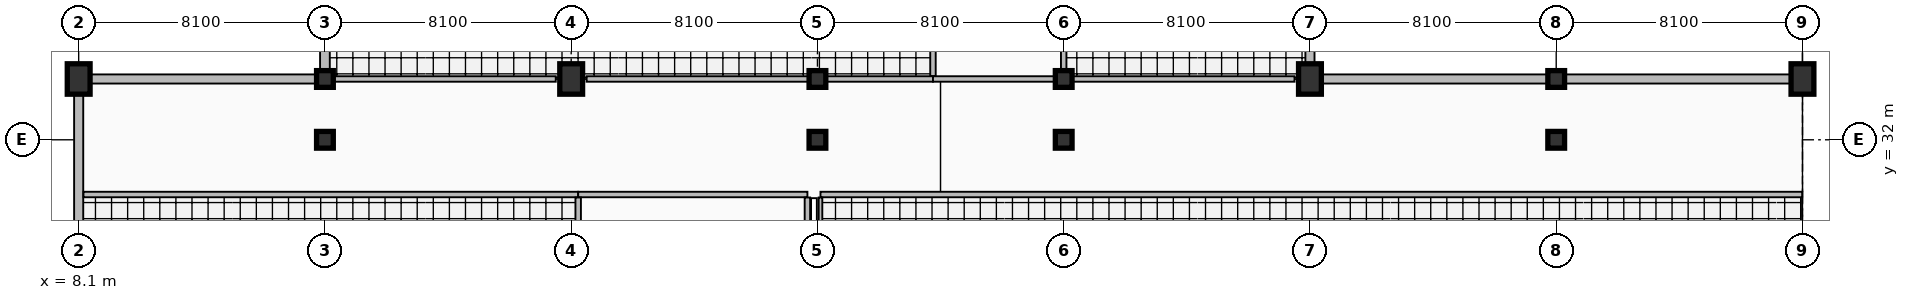
"""IFC4 building model, lengths in metres.
Left out: names, types, materials, properties, quantities, classifications, styles, units other than length and angle.
Written with IfcOpenShell. Run it as: python <this file> out.ifc"""

import sys

from ifc_helpers import new_model, si_unit, direction, frame, frame_2d, origin, origin_2d, place, context, subcontext, project, spatial, rectangle, extrude, element, fill, save


model = new_model("IFC4")
c1 = context("Model", 3, precision=1e-05, world=origin(), true_north=direction((0.0, 1.0)))
c2 = subcontext(c1, "Body", "Model", "MODEL_VIEW")
j1 = project(units=[si_unit("LENGTHUNIT", "METRE"), si_unit("PLANEANGLEUNIT", "RADIAN")], contexts=[c1])
p1 = place(None, origin())
s1 = spatial("IfcSite", under=j1, at=p1, CompositionType="ELEMENT")
p2 = place(p1, origin())
s2 = spatial("IfcBuilding", under=s1, at=p2, CompositionType="ELEMENT")
p3 = place(p2, frame((0.0, 0.0, 10.2)))
s3 = spatial("IfcBuildingStorey", under=s2, at=p3, CompositionType="ELEMENT", Elevation=10.2)
p4 = place(p3, frame((8.1, 34.0, 0.0), z_axis=(0.0, 0.0, 1.0), x_axis=(1.0, 0.0, 0.0)))
e1 = element("IfcColumn", 1, at=p4, inside=s3, PredefinedType="COLUMN", context=c2, shape_type="SweptSolid", body=[
    extrude(rectangle(XDim=0.75, YDim=1.0, at=origin_2d()), origin(), (0.0, 0.0, 1.0), 4.5),
])
for number, where, z_axis, x_axis in (
    (2, (16.2, 32.0, 0.0), (0.0, 0.0, 1.0), (1.0, 0.0, 0.0)),
    (3, (16.2, 34.0, 0.0), (0.0, 0.0, 1.0), (1.0, 0.0, 0.0)),
):
    element("IfcColumn", number, at=place(p3, frame(where, z_axis=z_axis, x_axis=x_axis)), inside=s3, PredefinedType="COLUMN", context=c2, shape_type="SweptSolid", body=[
        extrude(rectangle(XDim=0.55, YDim=0.55, at=origin_2d()), origin(), (0.0, 0.0, 1.0), 4.24),
    ])
p5 = place(p3, frame((24.3, 34.0, 0.0), z_axis=(0.0, 0.0, 1.0), x_axis=(1.0, 0.0, 0.0)))
e4 = element("IfcColumn", 4, at=p5, inside=s3, PredefinedType="COLUMN", context=c2, shape_type="SweptSolid", body=[
    extrude(rectangle(XDim=0.75, YDim=1.0, at=origin_2d()), origin(), (0.0, 0.0, 1.0), 4.5),
])
for number, where, z_axis, x_axis in (
    (5, (32.4, 32.0, 0.0), (0.0, 0.0, 1.0), (1.0, 0.0, 0.0)),
    (6, (32.4, 34.0, 0.0), (0.0, 0.0, 1.0), (1.0, 0.0, 0.0)),
    (7, (40.5, 32.0, 0.0), (0.0, 0.0, 1.0), (1.0, 0.0, 0.0)),
    (8, (40.5, 34.0, 0.0), (0.0, 0.0, 1.0), (1.0, 0.0, 0.0)),
):
    element("IfcColumn", number, at=place(p3, frame(where, z_axis=z_axis, x_axis=x_axis)), inside=s3, PredefinedType="COLUMN", context=c2, shape_type="SweptSolid", body=[
        extrude(rectangle(XDim=0.55, YDim=0.55, at=origin_2d()), origin(), (0.0, 0.0, 1.0), 4.24),
    ])
p6 = place(p3, frame((48.6, 34.0, 0.0), z_axis=(0.0, 0.0, 1.0), x_axis=(1.0, 0.0, 0.0)))
e9 = element("IfcColumn", 9, at=p6, inside=s3, PredefinedType="COLUMN", context=c2, shape_type="SweptSolid", body=[
    extrude(rectangle(XDim=0.75, YDim=1.0, at=origin_2d()), origin(), (0.0, 0.0, 1.0), 4.5),
])
for number, where, z_axis, x_axis in (
    (10, (56.7, 32.0, 0.0), (0.0, 0.0, 1.0), (1.0, 0.0, 0.0)),
    (11, (56.7, 34.0, 0.0), (0.0, 0.0, 1.0), (1.0, 0.0, 0.0)),
):
    element("IfcColumn", number, at=place(p3, frame(where, z_axis=z_axis, x_axis=x_axis)), inside=s3, PredefinedType="COLUMN", context=c2, shape_type="SweptSolid", body=[
        extrude(rectangle(XDim=0.55, YDim=0.55, at=origin_2d()), origin(), (0.0, 0.0, 1.0), 4.24),
    ])
p7 = place(p3, frame((64.8, 34.0, 0.0), z_axis=(0.0, 0.0, 1.0), x_axis=(1.0, 0.0, 0.0)))
e12 = element("IfcColumn", 12, at=p7, inside=s3, PredefinedType="COLUMN", context=c2, shape_type="SweptSolid", body=[
    extrude(rectangle(XDim=0.75, YDim=1.0, at=origin_2d()), origin(), (0.0, 0.0, 1.0), 4.5),
])
p8 = place(p3, frame((64.8, 34.0, 0.0), z_axis=(0.0, 0.0, 1.0), x_axis=(-1.0, 0.0, 0.0)))
e13 = element("IfcWall", 13, at=p8, inside=s3, PredefinedType="SOLIDWALL", context=c2, shape_type="SweptSolid", body=[
    extrude(rectangle(XDim=16.2, YDim=0.3, at=frame_2d((8.1, 0.0))), origin(), (0.0, 0.0, 1.0), 3.62),
])
p9 = place(p3, frame((48.6, 34.0, 0.0), z_axis=(0.0, 0.0, 1.0), x_axis=(0.0, 1.0, 0.0)))
e14 = element("IfcWall", 14, at=p9, inside=s3, PredefinedType="SOLIDWALL", context=c2, shape_type="SweptSolid", body=[
    extrude(rectangle(XDim=13.82, YDim=0.3, at=frame_2d((6.91, 0.0))), origin(), (0.0, 0.0, 1.0), 3.732),
])
p10 = place(p9, frame((7.65, 0.0, 0.95)))
e15 = element("IfcOpeningElement", 15, at=p10, cuts=e14, PredefinedType="OPENING", context=c2, shape_type="SweptSolid", body=[
    extrude(rectangle(XDim=3.15, YDim=1.6, at=frame_2d((1.575, 0.8))), frame((0.0, 0.16, 0.0), z_axis=(0.0, -1.0, 0.0), x_axis=(1.0, 0.0, 0.0)), (0.0, 0.0, 1.0), 0.32),
])
p11 = place(p3, frame((16.2, 49.6, 0.0), z_axis=(0.0, 0.0, 1.0), x_axis=(0.0, -1.0, 0.0)))
e16 = element("IfcWall", 16, at=p11, inside=s3, PredefinedType="SOLIDWALL", context=c2, shape_type="SweptSolid", body=[
    extrude(rectangle(XDim=15.6, YDim=0.32, at=frame_2d((7.8, 0.0))), origin(), (0.0, 0.0, 1.0), 3.732),
])
p12 = place(p11, frame((4.5, 0.0, 0.85)))
e17 = element("IfcOpeningElement", 17, at=p12, cuts=e16, PredefinedType="OPENING", context=c2, shape_type="SweptSolid", body=[
    extrude(rectangle(XDim=1.8, YDim=2.1, at=frame_2d((0.9, 1.05))), frame((0.0, 0.17, 0.0), z_axis=(0.0, -1.0, 0.0), x_axis=(1.0, 0.0, 0.0)), (0.0, 0.0, 1.0), 0.34),
])
p13 = place(p3, frame((16.2, 34.0, 0.0), z_axis=(0.0, 0.0, 1.0), x_axis=(-1.0, 0.0, 0.0)))
e18 = element("IfcWall", 18, at=p13, inside=s3, PredefinedType="SOLIDWALL", context=c2, shape_type="SweptSolid", body=[
    extrude(rectangle(XDim=8.1, YDim=0.3, at=frame_2d((4.05, 0.0))), origin(), (0.0, 0.0, 1.0), 3.62),
])
p14 = place(p13, frame((3.15, 0.0, 0.85)))
e19 = element("IfcOpeningElement", 19, at=p14, cuts=e18, PredefinedType="OPENING", context=c2, shape_type="SweptSolid", body=[
    extrude(rectangle(XDim=1.8, YDim=2.4, at=frame_2d((0.9, 1.2))), frame((0.0, 0.16, 0.0), z_axis=(0.0, -1.0, 0.0), x_axis=(1.0, 0.0, 0.0)), (0.0, 0.0, 1.0), 0.32),
])
p15 = place(p3, frame((8.1, 34.0, 0.0), z_axis=(0.0, 0.0, 1.0), x_axis=(0.0, -1.0, 0.0)))
e20 = element("IfcWall", 20, at=p15, inside=s3, PredefinedType="SOLIDWALL", context=c2, shape_type="SweptSolid", body=[
    extrude(rectangle(XDim=9.0, YDim=0.3, at=frame_2d((4.5, 0.0))), origin(), (0.0, 0.0, 1.0), 3.366),
])
p16 = place(p15, frame((4.95, 0.0, 0.95)))
e21 = element("IfcOpeningElement", 21, at=p16, cuts=e20, PredefinedType="OPENING", context=c2, shape_type="SweptSolid", body=[
    extrude(rectangle(XDim=2.1, YDim=1.8, at=frame_2d((1.05, 0.9))), frame((0.0, 0.16, 0.0), z_axis=(0.0, -1.0, 0.0), x_axis=(1.0, 0.0, 0.0)), (0.0, 0.0, 1.0), 0.32),
])
p17 = place(p3, frame((8.258, 30.2, 0.0), z_axis=(0.0, 0.0, 1.0), x_axis=(1.0, 0.0, 0.0)))
e22 = element("IfcWall", 22, at=p17, inside=s3, PredefinedType="PARTITIONING", context=c2, shape_type="SweptSolid", body=[
    extrude(rectangle(XDim=16.272, YDim=0.18, at=frame_2d((8.136, 0.0))), origin(), (0.0, 0.0, 1.0), 4.24),
])
p18 = place(p17, frame((6.334, 0.0, 0.0)))
e23 = element("IfcOpeningElement", 23, at=p18, cuts=e22, PredefinedType="OPENING", context=c2, shape_type="SweptSolid", body=[
    extrude(rectangle(XDim=1.0, YDim=2.2, at=frame_2d((0.5, 1.1))), frame((0.0, 0.1, 0.0), z_axis=(0.0, -1.0, 0.0), x_axis=(1.0, 0.0, 0.0)), (0.0, 0.0, 1.0), 0.2),
])
p19 = place(p3, frame((16.483, 34.0, 0.0), z_axis=(0.0, 0.0, 1.0), x_axis=(1.0, 0.0, 0.0)))
e24 = element("IfcWall", 24, at=p19, inside=s3, PredefinedType="PARTITIONING", context=c2, shape_type="SweptSolid", body=[
    extrude(rectangle(XDim=7.309, YDim=0.18, at=frame_2d((3.655, 0.0))), origin(), (0.0, 0.0, 1.0), 3.62),
])
p20 = place(p3, frame((24.808, 34.0, 0.0), z_axis=(0.0, 0.0, 1.0), x_axis=(1.0, 0.0, 0.0)))
e25 = element("IfcWall", 25, at=p20, inside=s3, PredefinedType="PARTITIONING", context=c2, shape_type="SweptSolid", body=[
    extrude(rectangle(XDim=7.309, YDim=0.18, at=frame_2d((3.654, 0.0))), origin(), (0.0, 0.0, 1.0), 3.544),
])
p21 = place(p3, frame((32.683, 34.0, 0.0), z_axis=(0.0, 0.0, 1.0), x_axis=(1.0, 0.0, 0.0)))
e26 = element("IfcWall", 26, at=p21, inside=s3, PredefinedType="PARTITIONING", context=c2, shape_type="SweptSolid", body=[
    extrude(rectangle(XDim=3.517, YDim=0.18, at=frame_2d((1.758, 0.0))), origin(), (0.0, 0.0, 1.0), 3.544),
])
p22 = place(p3, frame((24.53, 30.2, 0.0), z_axis=(0.0, 0.0, 1.0), x_axis=(1.0, 0.0, 0.0)))
e27 = element("IfcWall", 27, at=p22, inside=s3, PredefinedType="PARTITIONING", context=c2, shape_type="SweptSolid", body=[
    extrude(rectangle(XDim=7.54, YDim=0.18, at=frame_2d((3.77, 0.0))), origin(), (0.0, 0.0, 1.0), 4.24),
])
p23 = place(p22, frame((3.22, 0.0, 0.0)))
e28 = element("IfcOpeningElement", 28, at=p23, cuts=e27, PredefinedType="OPENING", context=c2, shape_type="SweptSolid", body=[
    extrude(rectangle(XDim=1.1, YDim=2.2, at=frame_2d((0.55, 1.1))), frame((0.0, 0.1, 0.0), z_axis=(0.0, -1.0, 0.0), x_axis=(1.0, 0.0, 0.0)), (0.0, 0.0, 1.0), 0.2),
])
p24 = place(p3, frame((32.5, 30.2, 0.0), z_axis=(0.0, 0.0, 1.0), x_axis=(1.0, 0.0, 0.0)))
e29 = element("IfcWall", 29, at=p24, inside=s3, PredefinedType="PARTITIONING", context=c2, shape_type="SweptSolid", body=[
    extrude(rectangle(XDim=32.29, YDim=0.18, at=frame_2d((16.145, 0.0))), origin(), (0.0, 0.0, 1.0), 4.24),
])
p25 = place(p24, frame((15.595, 0.0, 0.0)))
e30 = element("IfcOpeningElement", 30, at=p25, cuts=e29, PredefinedType="OPENING", context=c2, shape_type="SweptSolid", body=[
    extrude(rectangle(XDim=1.1, YDim=2.2, at=frame_2d((0.55, 1.1))), frame((0.0, 0.1, 0.0), z_axis=(0.0, -1.0, 0.0), x_axis=(1.0, 0.0, 0.0)), (0.0, 0.0, 1.0), 0.2),
])
p26 = place(p3, frame((36.2, 34.0, 0.0), z_axis=(0.0, 0.0, 1.0), x_axis=(1.0, 0.0, 0.0)))
e31 = element("IfcWall", 31, at=p26, inside=s3, PredefinedType="PARTITIONING", context=c2, shape_type="SweptSolid", body=[
    extrude(rectangle(XDim=4.017, YDim=0.18, at=frame_2d((2.009, 0.0))), origin(), (0.0, 0.0, 1.0), 3.544),
])
p27 = place(p26, frame((1.408, 0.0, 0.0)))
e32 = element("IfcOpeningElement", 32, at=p27, cuts=e31, PredefinedType="OPENING", context=c2, shape_type="SweptSolid", body=[
    extrude(rectangle(XDim=1.2, YDim=2.2, at=frame_2d((0.6, 1.1))), frame((0.0, 0.1, 0.0), z_axis=(0.0, -1.0, 0.0), x_axis=(1.0, 0.0, 0.0)), (0.0, 0.0, 1.0), 0.2),
])
p28 = place(p3, frame((40.783, 34.0, 0.0), z_axis=(0.0, 0.0, 1.0), x_axis=(1.0, 0.0, 0.0)))
e33 = element("IfcWall", 33, at=p28, inside=s3, PredefinedType="PARTITIONING", context=c2, shape_type="SweptSolid", body=[
    extrude(rectangle(XDim=7.309, YDim=0.18, at=frame_2d((3.655, 0.0))), origin(), (0.0, 0.0, 1.0), 3.544),
])
p29 = place(p3, frame((24.53, 29.068, 0.0), z_axis=(0.0, 0.0, 1.0), x_axis=(0.0, 1.0, 0.0)))
e34 = element("IfcWall", 34, at=p29, inside=s3, PredefinedType="PARTITIONING", context=c2, shape_type="SweptSolid", body=[
    extrude(rectangle(XDim=1.034, YDim=0.18, at=frame_2d((0.517, 0.0))), origin(), (0.0, 0.0, 1.0), 3.366),
])
p30 = place(p3, frame((32.07, 29.068, 0.0), z_axis=(0.0, 0.0, 1.0), x_axis=(0.0, 1.0, 0.0)))
e35 = element("IfcWall", 35, at=p30, inside=s3, PredefinedType="PARTITIONING", context=c2, shape_type="SweptSolid", body=[
    extrude(rectangle(XDim=1.034, YDim=0.18, at=frame_2d((0.517, 0.0))), origin(), (0.0, 0.0, 1.0), 4.24),
])
p31 = place(p3, frame((32.5, 25.46, 0.0), z_axis=(0.0, 0.0, 1.0), x_axis=(0.0, 1.0, 0.0)))
e36 = element("IfcWall", 36, at=p31, inside=s3, PredefinedType="PARTITIONING", context=c2, shape_type="SweptSolid", body=[
    extrude(rectangle(XDim=4.642, YDim=0.12, at=frame_2d((2.321, 0.0))), origin(), (0.0, 0.0, 1.0), 3.769),
])
p32 = place(p3, frame((36.2, 34.098, 0.0), z_axis=(0.0, 0.0, 1.0), x_axis=(0.0, 1.0, 0.0)))
e37 = element("IfcWall", 37, at=p32, inside=s3, PredefinedType="PARTITIONING", context=c2, shape_type="SweptSolid", body=[
    extrude(rectangle(XDim=19.004, YDim=0.18, at=frame_2d((9.502, 0.0))), origin(), (0.0, 0.0, 1.0), 3.825),
])
p33 = place(p32, frame((8.952, 0.0, 0.0)))
e38 = element("IfcOpeningElement", 38, at=p33, cuts=e37, PredefinedType="OPENING", context=c2, shape_type="SweptSolid", body=[
    extrude(rectangle(XDim=1.1, YDim=2.2, at=frame_2d((0.55, 1.1))), frame((0.0, 0.1, 0.0), z_axis=(0.0, -1.0, 0.0), x_axis=(1.0, 0.0, 0.0)), (0.0, 0.0, 1.0), 0.2),
])
p34 = place(p3, frame((40.5, 34.283, 0.0), z_axis=(0.0, 0.0, 1.0), x_axis=(0.0, 1.0, 0.0)))
e39 = element("IfcWall", 39, at=p34, inside=s3, PredefinedType="PARTITIONING", context=c2, shape_type="SweptSolid", body=[
    extrude(rectangle(XDim=5.409, YDim=0.18, at=frame_2d((2.705, 0.0))), origin(), (0.0, 0.0, 1.0), 3.769),
])
p35 = place(p14, origin())
e40 = element("IfcWindow", 40, at=p35, inside=s3, PartitioningType="TRIPLE_PANEL_VERTICAL", PredefinedType="WINDOW", context=c2, shape_type="SweptSolid", body=[
    extrude(rectangle(XDim=1.8, YDim=2.4, at=frame_2d((0.9, 1.2))), frame((0.0, 0.03, 0.0), z_axis=(0.0, -1.0, 0.0), x_axis=(1.0, 0.0, 0.0)), (0.0, 0.0, 1.0), 0.06),
])
fill(e19, e40)
p36 = place(p18, frame((1.0, 0.0, 0.0), z_axis=(0.0, 0.0, 1.0), x_axis=(-1.0, 0.0, 0.0)))
e41 = element("IfcDoor", 41, at=p36, inside=s3, OperationType="SINGLE_SWING_LEFT", PredefinedType="DOOR", context=c2, shape_type="SweptSolid", body=[
    extrude(rectangle(XDim=1.0, YDim=2.2, at=frame_2d((0.5, 1.1))), frame((0.0, 0.025, 0.0), z_axis=(0.0, -1.0, 0.0), x_axis=(1.0, 0.0, 0.0)), (0.0, 0.0, 1.0), 0.05),
])
fill(e23, e41)
p37 = place(p23, origin())
e42 = element("IfcDoor", 42, at=p37, inside=s3, OperationType="SINGLE_SWING_RIGHT", PredefinedType="DOOR", context=c2, shape_type="SweptSolid", body=[
    extrude(rectangle(XDim=1.1, YDim=2.2, at=frame_2d((0.55, 1.1))), frame((0.0, 0.025, 0.0), z_axis=(0.0, -1.0, 0.0), x_axis=(1.0, 0.0, 0.0)), (0.0, 0.0, 1.0), 0.05),
])
fill(e28, e42)
p38 = place(p25, frame((1.1, 0.0, 0.0), z_axis=(0.0, 0.0, 1.0), x_axis=(-1.0, 0.0, 0.0)))
e43 = element("IfcDoor", 43, at=p38, inside=s3, OperationType="SINGLE_SWING_RIGHT", PredefinedType="DOOR", context=c2, shape_type="SweptSolid", body=[
    extrude(rectangle(XDim=1.1, YDim=2.2, at=frame_2d((0.55, 1.1))), frame((0.0, 0.025, 0.0), z_axis=(0.0, -1.0, 0.0), x_axis=(1.0, 0.0, 0.0)), (0.0, 0.0, 1.0), 0.05),
])
fill(e30, e43)
p39 = place(p27, origin())
e44 = element("IfcDoor", 44, at=p39, inside=s3, OperationType="SINGLE_SWING_LEFT", PredefinedType="DOOR", context=c2, shape_type="SweptSolid", body=[
    extrude(rectangle(XDim=1.2, YDim=2.2, at=frame_2d((0.6, 1.1))), frame((0.0, 0.025, 0.0), z_axis=(0.0, -1.0, 0.0), x_axis=(1.0, 0.0, 0.0)), (0.0, 0.0, 1.0), 0.05),
])
fill(e32, e44)
save(model, sys.argv[1])
